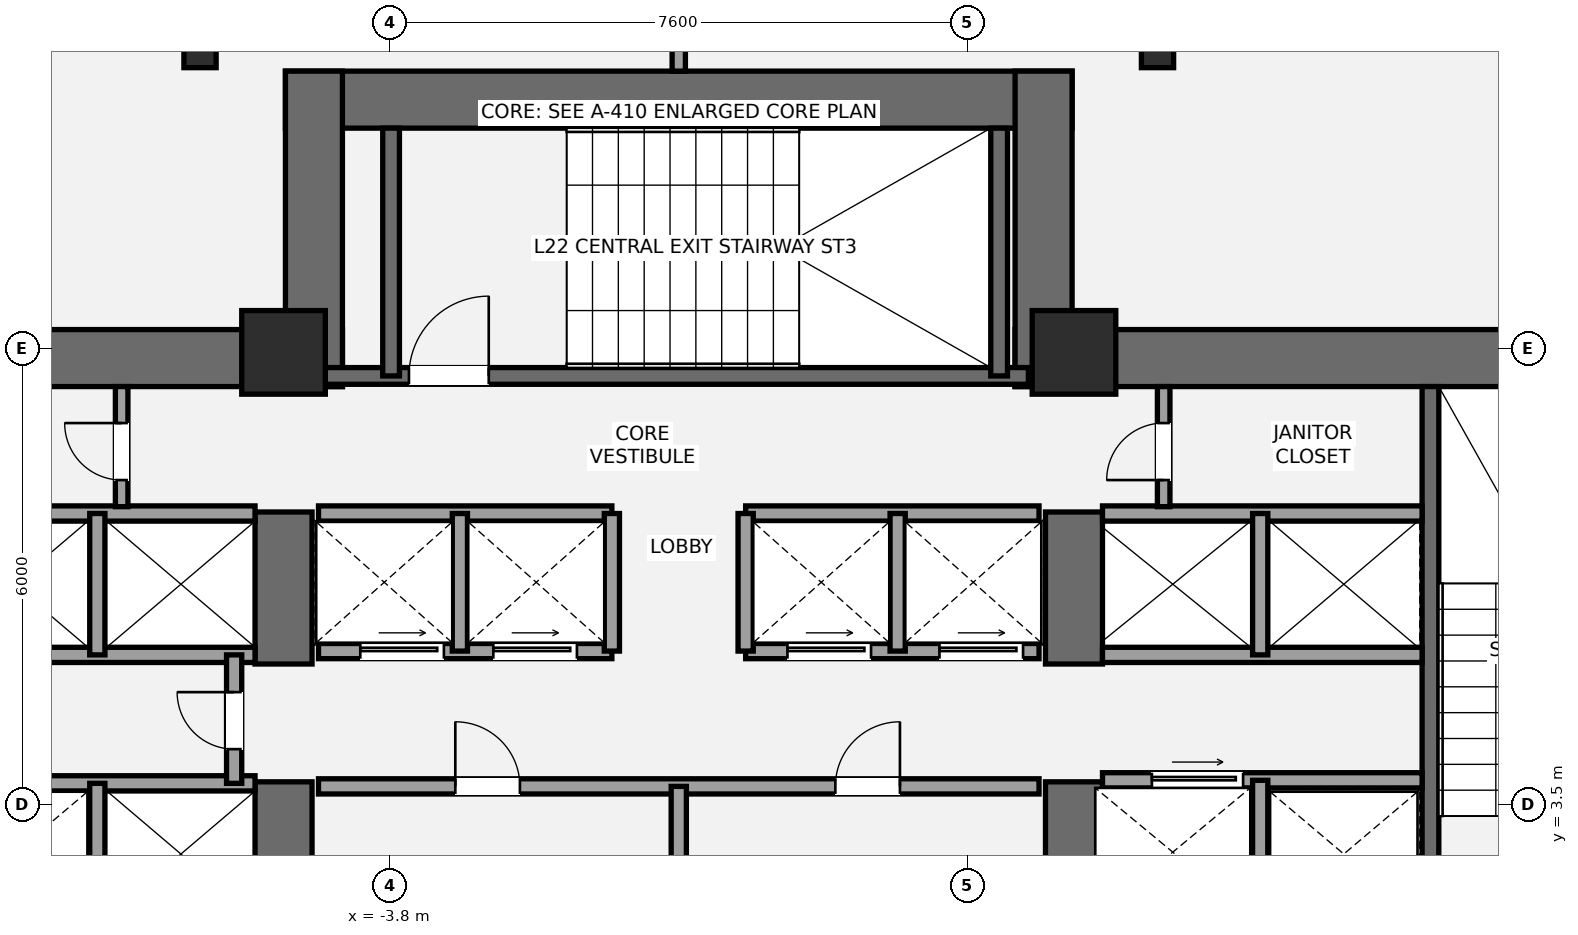
"""IFC4 building model, lengths in metres.
Left out: names, types, materials, properties, quantities, classifications, styles, units other than length and angle.
Written with IfcOpenShell. Run it as: python <this file> out.ifc"""

import sys

from ifc_helpers import new_model, si_unit, direction, frame, frame_2d, origin, origin_2d, place, context, subcontext, project, spatial, rectangle, i_section, extrude, element, fill, save


model = new_model("IFC4")
c1 = context("Model", 3, precision=1e-05, world=origin(), true_north=direction((0.0, 1.0)))
c2 = subcontext(c1, "Body", "Model", "MODEL_VIEW")
j1 = project(units=[si_unit("LENGTHUNIT", "METRE"), si_unit("PLANEANGLEUNIT", "RADIAN")], contexts=[c1])
p1 = place(None, origin())
s1 = spatial("IfcSite", under=j1, at=p1, CompositionType="ELEMENT")
p2 = place(p1, origin())
s2 = spatial("IfcBuilding", under=s1, at=p2, CompositionType="ELEMENT")
p3 = place(p2, frame((0.0, 0.0, 86.1)))
s3 = spatial("IfcBuildingStorey", under=s2, at=p3, CompositionType="ELEMENT", Elevation=86.1)
p4 = place(p3, frame((-13.9, 9.375, 0.0), z_axis=(0.0, 0.0, 1.0), x_axis=(1.0, 0.0, 0.0)))
e1 = element("IfcWall", 1, at=p4, inside=s3, PredefinedType="SHEAR", context=c2, shape_type="SweptSolid", body=[
    extrude(rectangle(XDim=9.475, YDim=0.75, at=frame_2d((4.737, 0.0))), origin(), (0.0, 0.0, 1.0), 3.5),
])
p5 = place(p3, frame((-5.2, 1.1, 0.0), z_axis=(0.0, 0.0, 1.0), x_axis=(0.0, 1.0, 0.0)))
e2 = element("IfcWall", 2, at=p5, inside=s3, PredefinedType="SHEAR", context=c2, shape_type="SweptSolid", body=[
    extrude(rectangle(XDim=2.7, YDim=0.75, at=frame_2d((1.35, 0.0))), origin(), (0.0, 0.0, 1.0), 3.5),
])
p6 = place(p3, frame((-5.2, 5.35, 0.0), z_axis=(0.0, 0.0, 1.0), x_axis=(0.0, 1.0, 0.0)))
e3 = element("IfcWall", 3, at=p6, inside=s3, PredefinedType="SHEAR", context=c2, shape_type="SweptSolid", body=[
    extrude(rectangle(XDim=2.0, YDim=0.75, at=frame_2d((1.0, 0.0))), origin(), (0.0, 0.0, 1.0), 3.5),
])
p7 = place(p3, frame((4.425, 9.375, 0.0), z_axis=(0.0, 0.0, 1.0), x_axis=(1.0, 0.0, 0.0)))
e4 = element("IfcWall", 4, at=p7, inside=s3, PredefinedType="SHEAR", context=c2, shape_type="SweptSolid", body=[
    extrude(rectangle(XDim=9.475, YDim=0.75, at=frame_2d((4.737, 0.0))), origin(), (0.0, 0.0, 1.0), 3.5),
])
p8 = place(p3, frame((5.2, 1.1, 0.0), z_axis=(0.0, 0.0, 1.0), x_axis=(0.0, 1.0, 0.0)))
e5 = element("IfcWall", 5, at=p8, inside=s3, PredefinedType="SHEAR", context=c2, shape_type="SweptSolid", body=[
    extrude(rectangle(XDim=2.7, YDim=0.75, at=frame_2d((1.35, 0.0))), origin(), (0.0, 0.0, 1.0), 3.5),
])
p9 = place(p3, frame((5.2, 5.35, 0.0), z_axis=(0.0, 0.0, 1.0), x_axis=(0.0, 1.0, 0.0)))
e6 = element("IfcWall", 6, at=p9, inside=s3, PredefinedType="SHEAR", context=c2, shape_type="SweptSolid", body=[
    extrude(rectangle(XDim=2.0, YDim=0.75, at=frame_2d((1.0, 0.0))), origin(), (0.0, 0.0, 1.0), 3.5),
])
p10 = place(p3, frame((9.89, 1.85, 0.0), z_axis=(0.0, 0.0, 1.0), x_axis=(0.0, 1.0, 0.0)))
e7 = element("IfcWall", 7, at=p10, inside=s3, PredefinedType="SHEAR", context=c2, shape_type="SweptSolid", body=[
    extrude(rectangle(XDim=7.15, YDim=0.22, at=frame_2d((3.575, 0.0))), origin(), (0.0, 0.0, 1.0), 3.5),
])
p11 = place(p3, frame((-5.175, 12.775, 0.0), z_axis=(0.0, 0.0, 1.0), x_axis=(1.0, 0.0, 0.0)))
e8 = element("IfcWall", 8, at=p11, inside=s3, PredefinedType="SHEAR", context=c2, shape_type="SweptSolid", body=[
    extrude(rectangle(XDim=10.35, YDim=0.75, at=frame_2d((5.175, 0.0))), origin(), (0.0, 0.0, 1.0), 3.5),
])
for number, where, z_axis, x_axis in (
    (9, (-4.8, 9.0, 0.0), (0.0, 0.0, 1.0), (0.0, 1.0, 0.0)),
    (10, (4.8, 9.0, 0.0), (0.0, 0.0, 1.0), (0.0, 1.0, 0.0)),
):
    element("IfcWall", number, at=place(p3, frame(where, z_axis=z_axis, x_axis=x_axis)), inside=s3, PredefinedType="SHEAR", context=c2, shape_type="SweptSolid", body=[
        extrude(rectangle(XDim=4.15, YDim=0.75, at=frame_2d((2.075, 0.0))), origin(), (0.0, 0.0, 1.0), 3.5),
    ])
p12 = place(p3, frame((-4.7, 9.14, 0.0), z_axis=(0.0, 0.0, 1.0), x_axis=(1.0, 0.0, 0.0)))
e11 = element("IfcWall", 11, at=p12, inside=s3, PredefinedType="SHEAR", context=c2, shape_type="SweptSolid", body=[
    extrude(rectangle(XDim=9.3, YDim=0.22, at=frame_2d((4.65, 0.0))), origin(), (0.0, 0.0, 1.0), 3.5),
])
p13 = place(p12, frame((1.15, 0.0, 0.0)))
e12 = element("IfcOpeningElement", 12, at=p13, cuts=e11, PredefinedType="OPENING", context=c2, shape_type="SweptSolid", body=[
    extrude(rectangle(XDim=1.05, YDim=2.15, at=frame_2d((0.525, 1.075))), frame((0.0, 0.12, 0.0), z_axis=(0.0, -1.0, 0.0), x_axis=(1.0, 0.0, 0.0)), (0.0, 0.0, 1.0), 0.24),
])
for number, where, z_axis, x_axis in (
    (13, (-3.785, 9.14, 0.0), (0.0, 0.0, 1.0), (0.0, 1.0, 0.0)),
    (14, (4.215, 9.14, 0.0), (0.0, 0.0, 1.0), (0.0, 1.0, 0.0)),
):
    element("IfcWall", number, at=place(p3, frame(where, z_axis=z_axis, x_axis=x_axis)), inside=s3, PredefinedType="SHEAR", context=c2, shape_type="SweptSolid", body=[
        extrude(rectangle(XDim=3.26, YDim=0.22, at=frame_2d((1.63, 0.0))), origin(), (0.0, 0.0, 1.0), 3.5),
    ])
for number, where, z_axis, x_axis in (
    (15, (-5.2, 9.45, 0.0), (0.0, 0.0, 1.0), (1.0, 0.0, 0.0)),
    (16, (5.2, 9.45, 0.0), (0.0, 0.0, 1.0), (1.0, 0.0, 0.0)),
):
    element("IfcColumn", number, at=place(p3, frame(where, z_axis=z_axis, x_axis=x_axis)), inside=s3, PredefinedType="COLUMN", context=c2, shape_type="SweptSolid", body=[
        extrude(rectangle(XDim=1.1, YDim=1.1, at=origin_2d()), origin(), (0.0, 0.0, 1.0), 3.5),
    ])
for number, where, z_axis, x_axis in (
    (17, (6.299, 13.433, 0.0), (0.0, 0.0, 1.0), (1.0, 0.0, 0.0)),
    (18, (-6.299, 13.433, 0.0), (0.0, 0.0, 1.0), (1.0, 0.0, 0.0)),
):
    element("IfcColumn", number, at=place(p3, frame(where, z_axis=z_axis, x_axis=x_axis)), inside=s3, PredefinedType="COLUMN", context=c2, shape_type="SweptSolid", body=[
        extrude(i_section(OverallWidth=0.424, OverallDepth=0.474, WebThickness=0.048, FlangeThickness=0.077, at=origin_2d()), origin(), (0.0, 0.0, 1.0), 3.5),
    ])
p14 = place(p3, frame((-9.78, 3.78, 0.0), z_axis=(0.0, 0.0, 1.0), x_axis=(1.0, 0.0, 0.0)))
e19 = element("IfcWall", 19, at=p14, inside=s3, PredefinedType="SOLIDWALL", context=c2, shape_type="SweptSolid", body=[
    extrude(rectangle(XDim=4.205, YDim=0.2, at=frame_2d((2.103, 0.0))), origin(), (0.0, 0.0, 1.0), 3.31),
])
p15 = place(p3, frame((-7.65, 1.85, 0.0), z_axis=(0.0, 0.0, 1.0), x_axis=(0.0, 1.0, 0.0)))
e20 = element("IfcWall", 20, at=p15, inside=s3, PredefinedType="SOLIDWALL", context=c2, shape_type="SweptSolid", body=[
    extrude(rectangle(XDim=1.93, YDim=0.2, at=frame_2d((0.965, 0.0))), origin(), (0.0, 0.0, 1.0), 3.31),
])
for number, where, z_axis, x_axis in (
    (21, (-9.78, 5.47, 0.0), (0.0, 0.0, 1.0), (1.0, 0.0, 0.0)),
    (22, (-9.78, 7.33, 0.0), (0.0, 0.0, 1.0), (1.0, 0.0, 0.0)),
):
    element("IfcWall", number, at=place(p3, frame(where, z_axis=z_axis, x_axis=x_axis)), inside=s3, PredefinedType="SOLIDWALL", context=c2, shape_type="SweptSolid", body=[
        extrude(rectangle(XDim=4.205, YDim=0.2, at=frame_2d((2.103, 0.0))), origin(), (0.0, 0.0, 1.0), 3.31),
    ])
p16 = place(p3, frame((-7.65, 5.47, 0.0), z_axis=(0.0, 0.0, 1.0), x_axis=(0.0, 1.0, 0.0)))
e23 = element("IfcWall", 23, at=p16, inside=s3, PredefinedType="SOLIDWALL", context=c2, shape_type="SweptSolid", body=[
    extrude(rectangle(XDim=1.86, YDim=0.2, at=frame_2d((0.93, 0.0))), origin(), (0.0, 0.0, 1.0), 3.31),
])
p17 = place(p3, frame((-5.85, 3.78, 0.0), z_axis=(0.0, 0.0, 1.0), x_axis=(0.0, 1.0, 0.0)))
e24 = element("IfcWall", 24, at=p17, inside=s3, PredefinedType="SOLIDWALL", context=c2, shape_type="SweptSolid", body=[
    extrude(rectangle(XDim=1.69, YDim=0.2, at=frame_2d((0.845, 0.0))), origin(), (0.0, 0.0, 1.0), 3.31),
])
p18 = place(p17, frame((0.45, 0.0, 0.0)))
e25 = element("IfcOpeningElement", 25, at=p18, cuts=e24, PredefinedType="OPENING", context=c2, shape_type="SweptSolid", body=[
    extrude(rectangle(XDim=0.75, YDim=2.1, at=frame_2d((0.375, 1.05))), frame((0.0, 0.11, 0.0), z_axis=(0.0, -1.0, 0.0), x_axis=(1.0, 0.0, 0.0)), (0.0, 0.0, 1.0), 0.22),
])
p19 = place(p3, frame((5.575, 3.82, 0.0), z_axis=(0.0, 0.0, 1.0), x_axis=(1.0, 0.0, 0.0)))
e26 = element("IfcWall", 26, at=p19, inside=s3, PredefinedType="SOLIDWALL", context=c2, shape_type="SweptSolid", body=[
    extrude(rectangle(XDim=4.205, YDim=0.2, at=frame_2d((2.103, 0.0))), origin(), (0.0, 0.0, 1.0), 3.31),
])
p20 = place(p19, frame((0.65, 0.0, 0.0)))
e27 = element("IfcOpeningElement", 27, at=p20, cuts=e26, PredefinedType="OPENING", context=c2, shape_type="SweptSolid", body=[
    extrude(rectangle(XDim=1.2, YDim=2.2, at=frame_2d((0.6, 1.1))), frame((0.0, 0.11, 0.0), z_axis=(0.0, -1.0, 0.0), x_axis=(1.0, 0.0, 0.0)), (0.0, 0.0, 1.0), 0.22),
])
p21 = place(p3, frame((7.65, 1.85, 0.0), z_axis=(0.0, 0.0, 1.0), x_axis=(0.0, 1.0, 0.0)))
e28 = element("IfcWall", 28, at=p21, inside=s3, PredefinedType="SOLIDWALL", context=c2, shape_type="SweptSolid", body=[
    extrude(rectangle(XDim=1.97, YDim=0.2, at=frame_2d((0.985, 0.0))), origin(), (0.0, 0.0, 1.0), 3.31),
])
for number, where, z_axis, x_axis in (
    (29, (5.575, 5.47, 0.0), (0.0, 0.0, 1.0), (1.0, 0.0, 0.0)),
    (30, (5.575, 7.33, 0.0), (0.0, 0.0, 1.0), (1.0, 0.0, 0.0)),
):
    element("IfcWall", number, at=place(p3, frame(where, z_axis=z_axis, x_axis=x_axis)), inside=s3, PredefinedType="SOLIDWALL", context=c2, shape_type="SweptSolid", body=[
        extrude(rectangle(XDim=4.205, YDim=0.2, at=frame_2d((2.103, 0.0))), origin(), (0.0, 0.0, 1.0), 3.31),
    ])
p22 = place(p3, frame((7.65, 5.47, 0.0), z_axis=(0.0, 0.0, 1.0), x_axis=(0.0, 1.0, 0.0)))
e31 = element("IfcWall", 31, at=p22, inside=s3, PredefinedType="SOLIDWALL", context=c2, shape_type="SweptSolid", body=[
    extrude(rectangle(XDim=1.86, YDim=0.2, at=frame_2d((0.93, 0.0))), origin(), (0.0, 0.0, 1.0), 3.31),
])
p23 = place(p3, frame((-4.74, 3.74, 0.0), z_axis=(0.0, 0.0, 1.0), x_axis=(1.0, 0.0, 0.0)))
e32 = element("IfcWall", 32, at=p23, inside=s3, PredefinedType="SOLIDWALL", context=c2, shape_type="SweptSolid", body=[
    extrude(rectangle(XDim=9.48, YDim=0.2, at=frame_2d((4.74, 0.0))), origin(), (0.0, 0.0, 1.0), 3.31),
])
p24 = place(p23, frame((1.8, 0.0, 0.0)))
e33 = element("IfcOpeningElement", 33, at=p24, cuts=e32, PredefinedType="OPENING", context=c2, shape_type="SweptSolid", body=[
    extrude(rectangle(XDim=0.85, YDim=2.1, at=frame_2d((0.425, 1.05))), frame((0.0, 0.11, 0.0), z_axis=(0.0, -1.0, 0.0), x_axis=(1.0, 0.0, 0.0)), (0.0, 0.0, 1.0), 0.22),
])
p25 = place(p23, frame((6.8, 0.0, 0.0)))
e34 = element("IfcOpeningElement", 34, at=p25, cuts=e32, PredefinedType="OPENING", context=c2, shape_type="SweptSolid", body=[
    extrude(rectangle(XDim=0.85, YDim=2.1, at=frame_2d((0.425, 1.05))), frame((0.0, 0.11, 0.0), z_axis=(0.0, -1.0, 0.0), x_axis=(1.0, 0.0, 0.0)), (0.0, 0.0, 1.0), 0.22),
])
p26 = place(p3, frame((0.0, 1.92, 0.0), z_axis=(0.0, 0.0, 1.0), x_axis=(0.0, 1.0, 0.0)))
e35 = element("IfcWall", 35, at=p26, inside=s3, PredefinedType="SOLIDWALL", context=c2, shape_type="SweptSolid", body=[
    extrude(rectangle(XDim=1.82, YDim=0.2, at=frame_2d((0.91, 0.0))), origin(), (0.0, 0.0, 1.0), 3.31),
])
p27 = place(p3, frame((-4.74, 5.52, 0.0), z_axis=(0.0, 0.0, 1.0), x_axis=(1.0, 0.0, 0.0)))
e36 = element("IfcWall", 36, at=p27, inside=s3, PredefinedType="SOLIDWALL", context=c2, shape_type="SweptSolid", body=[
    extrude(rectangle(XDim=3.86, YDim=0.2, at=frame_2d((1.93, 0.0))), origin(), (0.0, 0.0, 1.0), 3.31),
])
p28 = place(p27, frame((0.55, 0.0, 0.0)))
e37 = element("IfcOpeningElement", 37, at=p28, cuts=e36, PredefinedType="OPENING", context=c2, shape_type="SweptSolid", body=[
    extrude(rectangle(XDim=1.1, YDim=2.2, at=frame_2d((0.55, 1.1))), frame((0.0, 0.11, 0.0), z_axis=(0.0, -1.0, 0.0), x_axis=(1.0, 0.0, 0.0)), (0.0, 0.0, 1.0), 0.22),
])
p29 = place(p27, frame((2.3, 0.0, 0.0)))
e38 = element("IfcOpeningElement", 38, at=p29, cuts=e36, PredefinedType="OPENING", context=c2, shape_type="SweptSolid", body=[
    extrude(rectangle(XDim=1.1, YDim=2.2, at=frame_2d((0.55, 1.1))), frame((0.0, 0.11, 0.0), z_axis=(0.0, -1.0, 0.0), x_axis=(1.0, 0.0, 0.0)), (0.0, 0.0, 1.0), 0.22),
])
p30 = place(p3, frame((0.88, 5.52, 0.0), z_axis=(0.0, 0.0, 1.0), x_axis=(1.0, 0.0, 0.0)))
e39 = element("IfcWall", 39, at=p30, inside=s3, PredefinedType="SOLIDWALL", context=c2, shape_type="SweptSolid", body=[
    extrude(rectangle(XDim=3.86, YDim=0.2, at=frame_2d((1.93, 0.0))), origin(), (0.0, 0.0, 1.0), 3.31),
])
p31 = place(p30, frame((0.55, 0.0, 0.0)))
e40 = element("IfcOpeningElement", 40, at=p31, cuts=e39, PredefinedType="OPENING", context=c2, shape_type="SweptSolid", body=[
    extrude(rectangle(XDim=1.1, YDim=2.2, at=frame_2d((0.55, 1.1))), frame((0.0, 0.11, 0.0), z_axis=(0.0, -1.0, 0.0), x_axis=(1.0, 0.0, 0.0)), (0.0, 0.0, 1.0), 0.22),
])
p32 = place(p30, frame((2.55, 0.0, 0.0)))
e41 = element("IfcOpeningElement", 41, at=p32, cuts=e39, PredefinedType="OPENING", context=c2, shape_type="SweptSolid", body=[
    extrude(rectangle(XDim=1.1, YDim=2.2, at=frame_2d((0.55, 1.1))), frame((0.0, 0.11, 0.0), z_axis=(0.0, -1.0, 0.0), x_axis=(1.0, 0.0, 0.0)), (0.0, 0.0, 1.0), 0.22),
])
for number, where, z_axis, x_axis in (
    (42, (-4.74, 7.33, 0.0), (0.0, 0.0, 1.0), (1.0, 0.0, 0.0)),
    (43, (0.88, 7.33, 0.0), (0.0, 0.0, 1.0), (1.0, 0.0, 0.0)),
):
    element("IfcWall", number, at=place(p3, frame(where, z_axis=z_axis, x_axis=x_axis)), inside=s3, PredefinedType="SOLIDWALL", context=c2, shape_type="SweptSolid", body=[
        extrude(rectangle(XDim=3.86, YDim=0.2, at=frame_2d((1.93, 0.0))), origin(), (0.0, 0.0, 1.0), 3.31),
    ])
for number, where, z_axis, x_axis in (
    (44, (-2.88, 5.52, 0.0), (0.0, 0.0, 1.0), (0.0, 1.0, 0.0)),
    (45, (2.88, 5.52, 0.0), (0.0, 0.0, 1.0), (0.0, 1.0, 0.0)),
    (46, (-0.88, 5.52, 0.0), (0.0, 0.0, 1.0), (0.0, 1.0, 0.0)),
    (47, (0.88, 5.52, 0.0), (0.0, 0.0, 1.0), (0.0, 1.0, 0.0)),
):
    element("IfcWall", number, at=place(p3, frame(where, z_axis=z_axis, x_axis=x_axis)), inside=s3, PredefinedType="SOLIDWALL", context=c2, shape_type="SweptSolid", body=[
        extrude(rectangle(XDim=1.81, YDim=0.2, at=frame_2d((0.905, 0.0))), origin(), (0.0, 0.0, 1.0), 3.31),
    ])
p33 = place(p3, frame((-7.33, 7.42, 0.0), z_axis=(0.0, 0.0, 1.0), x_axis=(0.0, 1.0, 0.0)))
e48 = element("IfcWall", 48, at=p33, inside=s3, PredefinedType="PARTITIONING", context=c2, shape_type="SweptSolid", body=[
    extrude(rectangle(XDim=1.58, YDim=0.165, at=frame_2d((0.79, 0.0))), origin(), (0.0, 0.0, 1.0), 3.31),
])
p34 = place(p33, frame((0.35, 0.0, 0.0)))
e49 = element("IfcOpeningElement", 49, at=p34, cuts=e48, PredefinedType="OPENING", context=c2, shape_type="SweptSolid", body=[
    extrude(rectangle(XDim=0.75, YDim=2.1, at=frame_2d((0.375, 1.05))), frame((0.0, 0.093, 0.0), z_axis=(0.0, -1.0, 0.0), x_axis=(1.0, 0.0, 0.0)), (0.0, 0.0, 1.0), 0.185),
])
p35 = place(p3, frame((6.38, 7.42, 0.0), z_axis=(0.0, 0.0, 1.0), x_axis=(0.0, 1.0, 0.0)))
e50 = element("IfcWall", 50, at=p35, inside=s3, PredefinedType="PARTITIONING", context=c2, shape_type="SweptSolid", body=[
    extrude(rectangle(XDim=1.58, YDim=0.165, at=frame_2d((0.79, 0.0))), origin(), (0.0, 0.0, 1.0), 3.31),
])
p36 = place(p35, frame((0.35, 0.0, 0.0)))
e51 = element("IfcOpeningElement", 51, at=p36, cuts=e50, PredefinedType="OPENING", context=c2, shape_type="SweptSolid", body=[
    extrude(rectangle(XDim=0.75, YDim=2.1, at=frame_2d((0.375, 1.05))), frame((0.0, 0.093, 0.0), z_axis=(0.0, -1.0, 0.0), x_axis=(1.0, 0.0, 0.0)), (0.0, 0.0, 1.0), 0.185),
])
p37 = place(p3, frame((0.0, 13.15, 0.0), z_axis=(0.0, 0.0, 1.0), x_axis=(0.0, 1.0, 0.0)))
e52 = element("IfcWall", 52, at=p37, inside=s3, PredefinedType="PARTITIONING", context=c2, shape_type="SweptSolid", body=[
    extrude(rectangle(XDim=6.2, YDim=0.175, at=frame_2d((3.1, 0.0))), origin(), (0.0, 0.0, 1.0), 2.763),
])
p38 = place(p13, origin())
e53 = element("IfcDoor", 53, at=p38, inside=s3, OperationType="SINGLE_SWING_RIGHT", PredefinedType="DOOR", context=c2, shape_type="SweptSolid", body=[
    extrude(rectangle(XDim=1.05, YDim=2.15, at=frame_2d((0.525, 1.075))), frame((0.0, 0.025, 0.0), z_axis=(0.0, -1.0, 0.0), x_axis=(1.0, 0.0, 0.0)), (0.0, 0.0, 1.0), 0.05),
])
fill(e12, e53)
p39 = place(p18, origin())
e54 = element("IfcDoor", 54, at=p39, inside=s3, OperationType="SINGLE_SWING_RIGHT", PredefinedType="DOOR", context=c2, shape_type="SweptSolid", body=[
    extrude(rectangle(XDim=0.75, YDim=2.1, at=frame_2d((0.375, 1.05))), frame((0.0, 0.025, 0.0), z_axis=(0.0, -1.0, 0.0), x_axis=(1.0, 0.0, 0.0)), (0.0, 0.0, 1.0), 0.05),
])
fill(e25, e54)
p40 = place(p20, origin())
e55 = element("IfcDoor", 55, at=p40, inside=s3, OperationType="SLIDING_TO_RIGHT", PredefinedType="DOOR", context=c2, shape_type="SweptSolid", body=[
    extrude(rectangle(XDim=1.2, YDim=2.2, at=frame_2d((0.6, 1.1))), frame((0.0, 0.025, 0.0), z_axis=(0.0, -1.0, 0.0), x_axis=(1.0, 0.0, 0.0)), (0.0, 0.0, 1.0), 0.05),
])
fill(e27, e55)
p41 = place(p24, origin())
e56 = element("IfcDoor", 56, at=p41, inside=s3, OperationType="SINGLE_SWING_LEFT", PredefinedType="DOOR", context=c2, shape_type="SweptSolid", body=[
    extrude(rectangle(XDim=0.85, YDim=2.1, at=frame_2d((0.425, 1.05))), frame((0.0, 0.025, 0.0), z_axis=(0.0, -1.0, 0.0), x_axis=(1.0, 0.0, 0.0)), (0.0, 0.0, 1.0), 0.05),
])
fill(e33, e56)
p42 = place(p25, origin())
e57 = element("IfcDoor", 57, at=p42, inside=s3, OperationType="SINGLE_SWING_RIGHT", PredefinedType="DOOR", context=c2, shape_type="SweptSolid", body=[
    extrude(rectangle(XDim=0.85, YDim=2.1, at=frame_2d((0.425, 1.05))), frame((0.0, 0.025, 0.0), z_axis=(0.0, -1.0, 0.0), x_axis=(1.0, 0.0, 0.0)), (0.0, 0.0, 1.0), 0.05),
])
fill(e34, e57)
p43 = place(p28, origin())
e58 = element("IfcDoor", 58, at=p43, inside=s3, OperationType="SLIDING_TO_LEFT", PredefinedType="DOOR", context=c2, shape_type="SweptSolid", body=[
    extrude(rectangle(XDim=1.1, YDim=2.2, at=frame_2d((0.55, 1.1))), frame((0.0, 0.025, 0.0), z_axis=(0.0, -1.0, 0.0), x_axis=(1.0, 0.0, 0.0)), (0.0, 0.0, 1.0), 0.05),
])
fill(e37, e58)
p44 = place(p29, origin())
e59 = element("IfcDoor", 59, at=p44, inside=s3, OperationType="SLIDING_TO_LEFT", PredefinedType="DOOR", context=c2, shape_type="SweptSolid", body=[
    extrude(rectangle(XDim=1.1, YDim=2.2, at=frame_2d((0.55, 1.1))), frame((0.0, 0.025, 0.0), z_axis=(0.0, -1.0, 0.0), x_axis=(1.0, 0.0, 0.0)), (0.0, 0.0, 1.0), 0.05),
])
fill(e38, e59)
p45 = place(p31, origin())
e60 = element("IfcDoor", 60, at=p45, inside=s3, OperationType="SLIDING_TO_LEFT", PredefinedType="DOOR", context=c2, shape_type="SweptSolid", body=[
    extrude(rectangle(XDim=1.1, YDim=2.2, at=frame_2d((0.55, 1.1))), frame((0.0, 0.025, 0.0), z_axis=(0.0, -1.0, 0.0), x_axis=(1.0, 0.0, 0.0)), (0.0, 0.0, 1.0), 0.05),
])
fill(e40, e60)
p46 = place(p32, origin())
e61 = element("IfcDoor", 61, at=p46, inside=s3, OperationType="SLIDING_TO_LEFT", PredefinedType="DOOR", context=c2, shape_type="SweptSolid", body=[
    extrude(rectangle(XDim=1.1, YDim=2.2, at=frame_2d((0.55, 1.1))), frame((0.0, 0.025, 0.0), z_axis=(0.0, -1.0, 0.0), x_axis=(1.0, 0.0, 0.0)), (0.0, 0.0, 1.0), 0.05),
])
fill(e41, e61)
p47 = place(p34, origin())
e62 = element("IfcDoor", 62, at=p47, inside=s3, OperationType="SINGLE_SWING_RIGHT", PredefinedType="DOOR", context=c2, shape_type="SweptSolid", body=[
    extrude(rectangle(XDim=0.75, YDim=2.1, at=frame_2d((0.375, 1.05))), frame((0.0, 0.025, 0.0), z_axis=(0.0, -1.0, 0.0), x_axis=(1.0, 0.0, 0.0)), (0.0, 0.0, 1.0), 0.05),
])
fill(e49, e62)
p48 = place(p36, origin())
e63 = element("IfcDoor", 63, at=p48, inside=s3, OperationType="SINGLE_SWING_LEFT", PredefinedType="DOOR", context=c2, shape_type="SweptSolid", body=[
    extrude(rectangle(XDim=0.75, YDim=2.1, at=frame_2d((0.375, 1.05))), frame((0.0, 0.025, 0.0), z_axis=(0.0, -1.0, 0.0), x_axis=(1.0, 0.0, 0.0)), (0.0, 0.0, 1.0), 0.05),
])
fill(e51, e63)
save(model, sys.argv[1])
